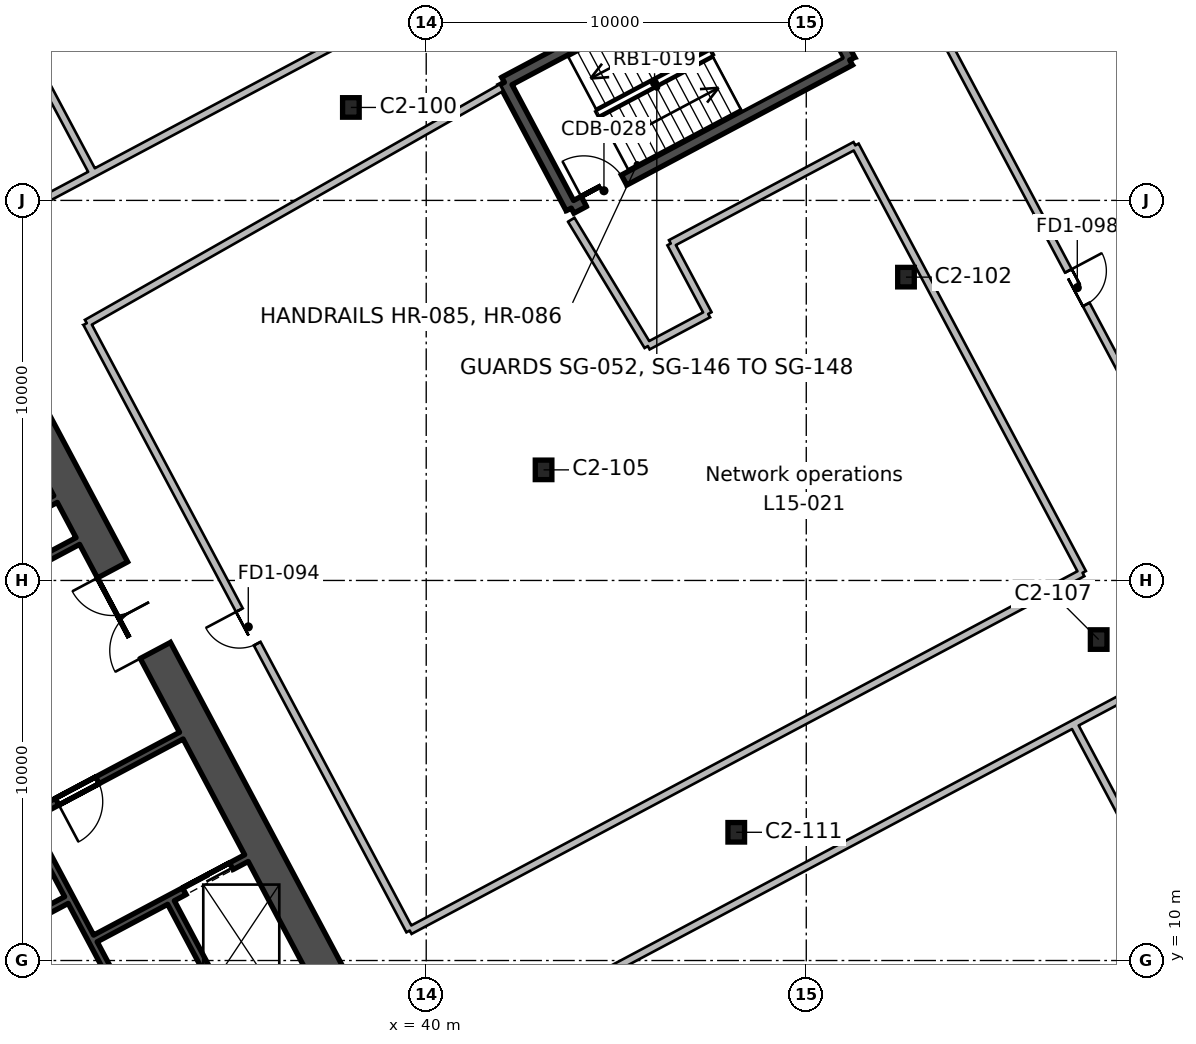
"""IFC4 building model, lengths in metres.
Left out: names, types, materials, properties, quantities, classifications, styles, units other than length and angle.
Written with IfcOpenShell. Run it as: python <this file> out.ifc"""

import sys

from ifc_helpers import new_model, si_unit, direction, frame, frame_2d, origin, origin_2d, place, context, subcontext, project, spatial, rectangle, i_section, extrude, element, fill, save


model = new_model("IFC4")
c1 = context("Model", 3, precision=1e-05, world=origin(), true_north=direction((0.0, 1.0)))
c2 = subcontext(c1, "Body", "Model", "MODEL_VIEW")
j1 = project(units=[si_unit("LENGTHUNIT", "METRE"), si_unit("PLANEANGLEUNIT", "RADIAN")], contexts=[c1])
p1 = place(None, origin())
s1 = spatial("IfcSite", under=j1, at=p1, CompositionType="ELEMENT")
p2 = place(p1, origin())
s2 = spatial("IfcBuilding", under=s1, at=p2, CompositionType="ELEMENT")
p3 = place(p2, frame((0.0, 0.0, 80.0)))
s3 = spatial("IfcBuildingStorey", under=s2, at=p3, CompositionType="ELEMENT", Elevation=80.0)
for number, where, z_axis, x_axis in (
    (1, (48.158, 13.374, 0.0), (0.0, 0.0, 1.0), (1.0, 0.0, 0.0)),
    (2, (57.694, 18.445, 0.0), (0.0, 0.0, 1.0), (1.0, 0.0, 0.0)),
    (3, (43.088, 22.91, 0.0), (0.0, 0.0, 1.0), (1.0, 0.0, 0.0)),
    (4, (52.624, 27.981, 0.0), (0.0, 0.0, 1.0), (1.0, 0.0, 0.0)),
    (5, (38.018, 32.446, 0.0), (0.0, 0.0, 1.0), (1.0, 0.0, 0.0)),
):
    element("IfcColumn", number, at=place(p3, frame(where, z_axis=z_axis, x_axis=x_axis)), inside=s3, PredefinedType="COLUMN", context=c2, shape_type="SweptSolid", body=[
        extrude(i_section(OverallWidth=0.437, OverallDepth=0.513, WebThickness=0.061, FlangeThickness=0.097, FilletRadius=0.015, at=origin_2d()), origin(), (0.0, 0.0, 1.0), 4.6),
    ])
p4 = place(p3, frame((37.849, 8.799, 0.0), z_axis=(0.0, 0.0, 1.0), x_axis=(-0.469465789982, 0.882950662289, 0.0)))
e6 = element("IfcWall", 6, at=p4, inside=s3, PredefinedType="SHEAR", context=c2, shape_type="SweptSolid", body=[
    extrude(rectangle(XDim=20.0, YDim=0.9, at=frame_2d((10.0, 0.0))), origin(), (0.0, 0.0, 1.0), 4.6),
])
p5 = place(p4, frame((10.6, 0.0, 0.0)))
e7 = element("IfcOpeningElement", 7, at=p5, cuts=e6, PredefinedType="OPENING", context=c2, shape_type="SweptSolid", body=[
    extrude(rectangle(XDim=2.4, YDim=2.4, at=frame_2d((1.2, 1.2))), frame((0.0, 0.46, 0.0), z_axis=(0.0, -1.0, 0.0), x_axis=(1.0, 0.0, 0.0)), (0.0, 0.0, 1.0), 0.92),
])
p6 = place(p3, frame((32.968, 7.223, 0.0), z_axis=(0.0, 0.0, 1.0), x_axis=(-0.469480409012, 0.88294288918, 0.0)))
e8 = element("IfcWall", 8, at=p6, inside=s3, PredefinedType="SHEAR", context=c2, shape_type="SweptSolid", body=[
    extrude(rectangle(XDim=7.3, YDim=0.2, at=frame_2d((3.65, 0.0))), origin(), (0.0, 0.0, 1.0), 4.6),
])
p7 = place(p3, frame((34.999, 8.303, 0.0), z_axis=(0.0, 0.0, 1.0), x_axis=(-0.4694665462, 0.882950260207, 0.0)))
e9 = element("IfcWall", 9, at=p7, inside=s3, PredefinedType="SHEAR", context=c2, shape_type="SweptSolid", body=[
    extrude(rectangle(XDim=3.65, YDim=0.2, at=frame_2d((1.825, 0.0))), origin(), (0.0, 0.0, 1.0), 4.6),
])
p8 = place(p3, frame((31.296, 10.581, 0.0), z_axis=(0.0, 0.0, 1.0), x_axis=(0.882960433586, 0.469447412093, 0.0)))
e10 = element("IfcWall", 10, at=p8, inside=s3, PredefinedType="SHEAR", context=c2, shape_type="SweptSolid", body=[
    extrude(rectangle(XDim=4.5, YDim=0.2, at=frame_2d((2.25, 0.0))), origin(), (0.0, 0.0, 1.0), 4.6),
])
p9 = place(p8, frame((2.65, 0.0, 0.0)))
e11 = element("IfcOpeningElement", 11, at=p9, cuts=e10, PredefinedType="OPENING", context=c2, shape_type="SweptSolid", body=[
    extrude(rectangle(XDim=1.4, YDim=2.4, at=frame_2d((0.7, 1.2))), frame((0.0, 0.11, 0.0), z_axis=(0.0, -1.0, 0.0), x_axis=(1.0, 0.0, 0.0)), (0.0, 0.0, 1.0), 0.22),
])
p10 = place(p3, frame((25.941, 9.15, 0.0), z_axis=(0.0, 0.0, 1.0), x_axis=(0.882953967957, 0.469459572775, 0.0)))
e12 = element("IfcWall", 12, at=p10, inside=s3, PredefinedType="SHEAR", context=c2, shape_type="SweptSolid", body=[
    extrude(rectangle(XDim=5.2, YDim=0.2, at=frame_2d((2.6, 0.0))), origin(), (0.0, 0.0, 1.0), 4.6),
])
p11 = place(p3, frame((24.726, 11.222, 0.0), z_axis=(0.0, 0.0, 1.0), x_axis=(0.882940221191, 0.469485426614, 0.0)))
e13 = element("IfcWall", 13, at=p11, inside=s3, PredefinedType="SHEAR", context=c2, shape_type="SweptSolid", body=[
    extrude(rectangle(XDim=10.0, YDim=0.2, at=frame_2d((5.0, 0.0))), origin(), (0.0, 0.0, 1.0), 4.6),
])
p12 = place(p11, frame((6.3, 0.0, 0.0)))
e14 = element("IfcOpeningElement", 14, at=p12, cuts=e13, PredefinedType="OPENING", context=c2, shape_type="SweptSolid", body=[
    extrude(rectangle(XDim=1.2, YDim=2.1, at=frame_2d((0.6, 1.05))), frame((0.0, 0.11, 0.0), z_axis=(0.0, -1.0, 0.0), x_axis=(1.0, 0.0, 0.0)), (0.0, 0.0, 1.0), 0.22),
])
p13 = place(p11, frame((2.25, 0.0, 0.0)))
e15 = element("IfcOpeningElement", 15, at=p13, cuts=e13, PredefinedType="OPENING", context=c2, shape_type="SweptSolid", body=[
    extrude(rectangle(XDim=0.9, YDim=2.1, at=frame_2d((0.45, 1.05))), frame((0.0, 0.11, 0.0), z_axis=(0.0, -1.0, 0.0), x_axis=(1.0, 0.0, 0.0)), (0.0, 0.0, 1.0), 0.22),
])
p14 = place(p3, frame((23.769, 17.282, 0.0), z_axis=(0.0, 0.0, 1.0), x_axis=(0.882940221191, 0.469485426614, 0.0)))
e16 = element("IfcWall", 16, at=p14, inside=s3, PredefinedType="SHEAR", context=c2, shape_type="SweptSolid", body=[
    extrude(rectangle(XDim=8.0, YDim=0.2, at=frame_2d((4.0, 0.0))), origin(), (0.0, 0.0, 1.0), 4.6),
])
p15 = place(p3, frame((23.182, 18.385, 0.0), z_axis=(0.0, 0.0, 1.0), x_axis=(0.88295287151, 0.469461634952, 0.0)))
e17 = element("IfcWall", 17, at=p15, inside=s3, PredefinedType="SHEAR", context=c2, shape_type="SweptSolid", body=[
    extrude(rectangle(XDim=8.0, YDim=0.2, at=frame_2d((4.0, 0.0))), origin(), (0.0, 0.0, 1.0), 4.6),
])
p16 = place(p3, frame((49.384, 37.004, 0.0), z_axis=(0.0, 0.0, 1.0), x_axis=(0.46946936446, -0.882948761726, 0.0)))
e18 = element("IfcWall", 18, at=p16, inside=s3, PredefinedType="SHEAR", context=c2, shape_type="SweptSolid", body=[
    extrude(rectangle(XDim=3.75, YDim=0.3, at=frame_2d((1.875, 0.0))), origin(), (0.0, 0.0, 1.0), 4.6),
])
p17 = place(p3, frame((51.145, 33.693, 0.0), z_axis=(0.0, 0.0, 1.0), x_axis=(-0.882945809314, -0.469474917132, 0.0)))
e19 = element("IfcWall", 19, at=p17, inside=s3, PredefinedType="SHEAR", context=c2, shape_type="SweptSolid", body=[
    extrude(rectangle(XDim=8.3, YDim=0.3, at=frame_2d((4.15, 0.0))), origin(), (0.0, 0.0, 1.0), 4.6),
])
p18 = place(p17, frame((6.725, 0.0, 0.0)))
e20 = element("IfcOpeningElement", 20, at=p18, cuts=e19, PredefinedType="OPENING", context=c2, shape_type="SweptSolid", body=[
    extrude(rectangle(XDim=1.2, YDim=2.1, at=frame_2d((0.6, 1.05))), frame((0.0, 0.16, 0.0), z_axis=(0.0, -1.0, 0.0), x_axis=(1.0, 0.0, 0.0)), (0.0, 0.0, 1.0), 0.32),
])
p19 = place(p3, frame((43.816, 29.796, 0.0), z_axis=(0.0, 0.0, 1.0), x_axis=(-0.46946936446, 0.882948761726, 0.0)))
e21 = element("IfcWall", 21, at=p19, inside=s3, PredefinedType="SHEAR", context=c2, shape_type="SweptSolid", body=[
    extrude(rectangle(XDim=3.75, YDim=0.3, at=frame_2d((1.875, 0.0))), origin(), (0.0, 0.0, 1.0), 4.6),
])
p20 = place(p3, frame((42.055, 33.107, 0.0), z_axis=(0.0, 0.0, 1.0), x_axis=(0.882945809314, 0.469474917132, 0.0)))
e22 = element("IfcWall", 22, at=p20, inside=s3, PredefinedType="SHEAR", context=c2, shape_type="SweptSolid", body=[
    extrude(rectangle(XDim=8.3, YDim=0.3, at=frame_2d((4.15, 0.0))), origin(), (0.0, 0.0, 1.0), 4.6),
])
p21 = place(p3, frame((0.0, 14.1, 0.0), z_axis=(0.0, 0.0, 1.0), x_axis=(0.882942713919, 0.469480738623, 0.0)))
e23 = element("IfcWall", 23, at=p21, inside=s3, PredefinedType="PARTITIONING", context=c2, shape_type="SweptSolid", body=[
    extrude(rectangle(XDim=36.591, YDim=0.2, at=frame_2d((18.296, 0.0))), origin(), (0.0, 0.0, 1.0), 4.2),
])
p22 = place(p21, frame((20.45, 0.0, 0.0)))
e24 = element("IfcOpeningElement", 24, at=p22, cuts=e23, PredefinedType="OPENING", context=c2, shape_type="SweptSolid", body=[
    extrude(rectangle(XDim=1.0, YDim=2.1, at=frame_2d((0.5, 1.05))), frame((0.0, 0.11, 0.0), z_axis=(0.0, -1.0, 0.0), x_axis=(1.0, 0.0, 0.0)), (0.0, 0.0, 1.0), 0.22),
])
p23 = place(p21, frame((17.75, 0.0, 0.0)))
e25 = element("IfcOpeningElement", 25, at=p23, cuts=e23, PredefinedType="OPENING", context=c2, shape_type="SweptSolid", body=[
    extrude(rectangle(XDim=1.0, YDim=2.1, at=frame_2d((0.5, 1.05))), frame((0.0, 0.11, 0.0), z_axis=(0.0, -1.0, 0.0), x_axis=(1.0, 0.0, 0.0)), (0.0, 0.0, 1.0), 0.22),
])
p24 = place(p3, frame((57.041, 16.229, 0.0), z_axis=(0.0, 0.0, 1.0), x_axis=(-0.882947975476, -0.469470843188, 0.0)))
e26 = element("IfcWall", 26, at=p24, inside=s3, PredefinedType="PARTITIONING", context=c2, shape_type="SweptSolid", body=[
    extrude(rectangle(XDim=49.2, YDim=0.2, at=frame_2d((24.6, 0.0))), origin(), (0.0, 0.0, 1.0), 4.2),
])
p25 = place(p24, frame((33.25, 0.0, 0.0)))
e27 = element("IfcOpeningElement", 27, at=p25, cuts=e26, PredefinedType="OPENING", context=c2, shape_type="SweptSolid", body=[
    extrude(rectangle(XDim=1.0, YDim=2.1, at=frame_2d((0.5, 1.05))), frame((0.0, 0.11, 0.0), z_axis=(0.0, -1.0, 0.0), x_axis=(1.0, 0.0, 0.0)), (0.0, 0.0, 1.0), 0.22),
])
p26 = place(p24, frame((24.05, 0.0, 0.0)))
e28 = element("IfcOpeningElement", 28, at=p26, cuts=e26, PredefinedType="OPENING", context=c2, shape_type="SweptSolid", body=[
    extrude(rectangle(XDim=1.0, YDim=2.1, at=frame_2d((0.5, 1.05))), frame((0.0, 0.11, 0.0), z_axis=(0.0, -1.0, 0.0), x_axis=(1.0, 0.0, 0.0)), (0.0, 0.0, 1.0), 0.22),
])
p27 = place(p24, frame((20.95, 0.0, 0.0)))
e29 = element("IfcOpeningElement", 29, at=p27, cuts=e26, PredefinedType="OPENING", context=c2, shape_type="SweptSolid", body=[
    extrude(rectangle(XDim=1.0, YDim=2.1, at=frame_2d((0.5, 1.05))), frame((0.0, 0.11, 0.0), z_axis=(0.0, -1.0, 0.0), x_axis=(1.0, 0.0, 0.0)), (0.0, 0.0, 1.0), 0.22),
])
p28 = place(p3, frame((30.235, 32.599, 0.0), z_axis=(0.0, 0.0, 1.0), x_axis=(0.46945013559, -0.882958985568, 0.0)))
e30 = element("IfcWall", 30, at=p28, inside=s3, PredefinedType="PARTITIONING", context=c2, shape_type="SweptSolid", body=[
    extrude(rectangle(XDim=2.138, YDim=0.2, at=frame_2d((1.069, 0.0))), origin(), (0.0, 0.0, 1.0), 4.2),
])
p29 = place(p3, frame((30.235, 32.599, 0.0), z_axis=(0.0, 0.0, 1.0), x_axis=(-0.469599917758, 0.882879333341, 0.0)))
e31 = element("IfcWall", 31, at=p29, inside=s3, PredefinedType="PARTITIONING", context=c2, shape_type="SweptSolid", body=[
    extrude(rectangle(XDim=3.412, YDim=0.2, at=frame_2d((1.706, 0.0))), origin(), (0.0, 0.0, 1.0), 4.2),
])
p30 = place(p3, frame((32.308, 31.279, 0.0), z_axis=(0.0, 0.0, 1.0), x_axis=(0.882939951573, 0.469485933673, 0.0)))
e32 = element("IfcWall", 32, at=p30, inside=s3, PredefinedType="PARTITIONING", context=c2, shape_type="SweptSolid", body=[
    extrude(rectangle(XDim=20.239, YDim=0.2, at=frame_2d((10.12, 0.0))), origin(), (0.0, 0.0, 1.0), 4.2),
])
p31 = place(p30, frame((9.65, 0.0, 0.0)))
e33 = element("IfcOpeningElement", 33, at=p31, cuts=e32, PredefinedType="OPENING", context=c2, shape_type="SweptSolid", body=[
    extrude(rectangle(XDim=1.0, YDim=2.1, at=frame_2d((0.5, 1.05))), frame((0.0, 0.11, 0.0), z_axis=(0.0, -1.0, 0.0), x_axis=(1.0, 0.0, 0.0)), (0.0, 0.0, 1.0), 0.22),
])
p32 = place(p3, frame((57.034, 16.225, 0.0), z_axis=(0.0, 0.0, 1.0), x_axis=(0.469482945701, -0.882941540361, 0.0)))
e34 = element("IfcWall", 34, at=p32, inside=s3, PredefinedType="PARTITIONING", context=c2, shape_type="SweptSolid", body=[
    extrude(rectangle(XDim=8.75, YDim=0.2, at=frame_2d((4.375, 0.0))), origin(), (0.0, 0.0, 1.0), 4.2),
])
p33 = place(p3, frame((48.541, 15.56, 0.0), z_axis=(0.0, 0.0, 1.0), x_axis=(-0.882933406877, -0.469498241765, 0.0)))
e35 = element("IfcWall", 35, at=p33, inside=s3, PredefinedType="PARTITIONING", context=c2, shape_type="SweptSolid", body=[
    extrude(rectangle(XDim=10.164, YDim=0.2, at=frame_2d((5.082, 0.0))), origin(), (0.0, 0.0, 1.0), 4.2),
])
p34 = place(p3, frame((39.567, 10.788, 0.0), z_axis=(0.0, 0.0, 1.0), x_axis=(-0.469474056812, 0.882946266757, 0.0)))
e36 = element("IfcWall", 36, at=p34, inside=s3, PredefinedType="PARTITIONING", context=c2, shape_type="SweptSolid", body=[
    extrude(rectangle(XDim=18.101, YDim=0.2, at=frame_2d((9.05, 0.0))), origin(), (0.0, 0.0, 1.0), 4.2),
])
p35 = place(p34, frame((8.55, 0.0, 0.0)))
e37 = element("IfcOpeningElement", 37, at=p35, cuts=e36, PredefinedType="OPENING", context=c2, shape_type="SweptSolid", body=[
    extrude(rectangle(XDim=1.0, YDim=2.1, at=frame_2d((0.5, 1.05))), frame((0.0, 0.11, 0.0), z_axis=(0.0, -1.0, 0.0), x_axis=(1.0, 0.0, 0.0)), (0.0, 0.0, 1.0), 0.22),
])
p36 = place(p3, frame((31.069, 26.77, 0.0), z_axis=(0.0, 0.0, 1.0), x_axis=(0.86954617394, 0.493851649168, 0.0)))
e38 = element("IfcWall", 38, at=p36, inside=s3, PredefinedType="PARTITIONING", context=c2, shape_type="SweptSolid", body=[
    extrude(rectangle(XDim=12.55, YDim=0.2, at=frame_2d((6.275, 0.0))), origin(), (0.0, 0.0, 1.0), 4.2),
])
p37 = place(p3, frame((43.816, 29.491, 0.0), z_axis=(0.0, 0.0, 1.0), x_axis=(0.518473208291, -0.855093873376, 0.0)))
e39 = element("IfcWall", 39, at=p37, inside=s3, PredefinedType="PARTITIONING", context=c2, shape_type="SweptSolid", body=[
    extrude(rectangle(XDim=1.325, YDim=0.2, at=frame_2d((0.663, 0.0))), origin(), (0.0, 0.0, 1.0), 4.2),
])
p38 = place(p3, frame((45.831, 26.167, 0.0), z_axis=(0.0, 0.0, 1.0), x_axis=(-0.518386189645, 0.855146629757, 0.0)))
e40 = element("IfcWall", 40, at=p38, inside=s3, PredefinedType="PARTITIONING", context=c2, shape_type="SweptSolid", body=[
    extrude(rectangle(XDim=2.562, YDim=0.2, at=frame_2d((1.281, 0.0))), origin(), (0.0, 0.0, 1.0), 4.2),
])
p39 = place(p3, frame((47.42, 27.012, 0.0), z_axis=(0.0, 0.0, 1.0), x_axis=(-0.882911879422, -0.469538723829, 0.0)))
e41 = element("IfcWall", 41, at=p39, inside=s3, PredefinedType="PARTITIONING", context=c2, shape_type="SweptSolid", body=[
    extrude(rectangle(XDim=1.8, YDim=0.2, at=frame_2d((0.9, 0.0))), origin(), (0.0, 0.0, 1.0), 4.2),
])
p40 = place(p3, frame((46.434, 28.866, 0.0), z_axis=(0.0, 0.0, 1.0), x_axis=(0.882942083458, 0.469481924316, 0.0)))
e42 = element("IfcWall", 42, at=p40, inside=s3, PredefinedType="PARTITIONING", context=c2, shape_type="SweptSolid", body=[
    extrude(rectangle(XDim=5.5, YDim=0.2, at=frame_2d((2.75, 0.0))), origin(), (0.0, 0.0, 1.0), 4.2),
])
p41 = place(p3, frame((51.29, 31.448, 0.0), z_axis=(0.0, 0.0, 1.0), x_axis=(0.469459757109, -0.882953869947, 0.0)))
e43 = element("IfcWall", 43, at=p41, inside=s3, PredefinedType="PARTITIONING", context=c2, shape_type="SweptSolid", body=[
    extrude(rectangle(XDim=12.738, YDim=0.2, at=frame_2d((6.369, 0.0))), origin(), (0.0, 0.0, 1.0), 4.2),
])
p42 = place(p3, frame((57.27, 20.201, 0.0), z_axis=(0.0, 0.0, 1.0), x_axis=(-0.882965394181, -0.469438081837, 0.0)))
e44 = element("IfcWall", 44, at=p42, inside=s3, PredefinedType="PARTITIONING", context=c2, shape_type="SweptSolid", body=[
    extrude(rectangle(XDim=9.886, YDim=0.2, at=frame_2d((4.943, 0.0))), origin(), (0.0, 0.0, 1.0), 4.2),
])
p43 = place(p3, frame((47.42, 27.012, 0.0), z_axis=(0.0, 0.0, 1.0), x_axis=(-0.469489562011, 0.882938022266, 0.0)))
e45 = element("IfcWall", 45, at=p43, inside=s3, PredefinedType="PARTITIONING", context=c2, shape_type="SweptSolid", body=[
    extrude(rectangle(XDim=2.1, YDim=0.2, at=frame_2d((1.05, 0.0))), origin(), (0.0, 0.0, 1.0), 4.2),
])
p44 = place(p3, frame((57.041, 16.229, 0.0), z_axis=(0.0, 0.0, 1.0), x_axis=(0.882918476145, 0.469526319265, 0.0)))
e46 = element("IfcWall", 46, at=p44, inside=s3, PredefinedType="PARTITIONING", context=c2, shape_type="SweptSolid", body=[
    extrude(rectangle(XDim=5.467, YDim=0.2, at=frame_2d((2.733, 0.0))), origin(), (0.0, 0.0, 1.0), 4.2),
])
p45 = place(p3, frame((52.366, 36.665, 0.0), z_axis=(0.0, 0.0, 1.0), x_axis=(0.469480933333, -0.882942610387, 0.0)))
e47 = element("IfcWall", 47, at=p45, inside=s3, PredefinedType="PARTITIONING", context=c2, shape_type="SweptSolid", body=[
    extrude(rectangle(XDim=20.239, YDim=0.2, at=frame_2d((10.12, 0.0))), origin(), (0.0, 0.0, 1.0), 4.2),
])
p46 = place(p45, frame((9.65, 0.0, 0.0)))
e48 = element("IfcOpeningElement", 48, at=p46, cuts=e47, PredefinedType="OPENING", context=c2, shape_type="SweptSolid", body=[
    extrude(rectangle(XDim=1.0, YDim=2.1, at=frame_2d((0.5, 1.05))), frame((0.0, 0.11, 0.0), z_axis=(0.0, -1.0, 0.0), x_axis=(1.0, 0.0, 0.0)), (0.0, 0.0, 1.0), 0.22),
])
p47 = place(p3, frame((57.299, 39.208, 0.0), z_axis=(0.0, 0.0, 1.0), x_axis=(0.469480728433, -0.882942719337, 0.0)))
e49 = element("IfcWall", 49, at=p47, inside=s3, PredefinedType="PARTITIONING", context=c2, shape_type="SweptSolid", body=[
    extrude(rectangle(XDim=28.934, YDim=0.2, at=frame_2d((14.467, 0.0))), origin(), (0.0, 0.0, 1.0), 4.2),
])
p48 = place(p5, origin())
e50 = element("IfcDoor", 50, at=p48, inside=s3, OperationType="DOUBLE_DOOR_SINGLE_SWING", PredefinedType="DOOR", context=c2, shape_type="SweptSolid", body=[
    extrude(rectangle(XDim=2.4, YDim=2.4, at=frame_2d((1.2, 1.2))), frame((0.0, 0.025, 0.0), z_axis=(0.0, -1.0, 0.0), x_axis=(1.0, 0.0, 0.0)), (0.0, 0.0, 1.0), 0.05),
])
fill(e7, e50)
p49 = place(p12, frame((1.2, 0.0, 0.0), z_axis=(0.0, 0.0, 1.0), x_axis=(-1.0, 0.0, 0.0)))
e51 = element("IfcDoor", 51, at=p49, inside=s3, OperationType="SINGLE_SWING_RIGHT", PredefinedType="DOOR", context=c2, shape_type="SweptSolid", body=[
    extrude(rectangle(XDim=1.2, YDim=2.1, at=frame_2d((0.6, 1.05))), frame((0.0, 0.025, 0.0), z_axis=(0.0, -1.0, 0.0), x_axis=(1.0, 0.0, 0.0)), (0.0, 0.0, 1.0), 0.05),
])
fill(e14, e51)
p50 = place(p9, origin())
e52 = element("IfcDoor", 52, at=p50, inside=s3, OperationType="DOUBLE_DOOR_SLIDING", PredefinedType="DOOR", context=c2, shape_type="SweptSolid", body=[
    extrude(rectangle(XDim=1.4, YDim=2.4, at=frame_2d((0.7, 1.2))), frame((0.0, 0.025, 0.0), z_axis=(0.0, -1.0, 0.0), x_axis=(1.0, 0.0, 0.0)), (0.0, 0.0, 1.0), 0.05),
])
fill(e11, e52)
p51 = place(p18, frame((1.2, 0.0, 0.0), z_axis=(0.0, 0.0, 1.0), x_axis=(-1.0, 0.0, 0.0)))
e53 = element("IfcDoor", 53, at=p51, inside=s3, OperationType="SINGLE_SWING_LEFT", PredefinedType="DOOR", context=c2, shape_type="SweptSolid", body=[
    extrude(rectangle(XDim=1.2, YDim=2.1, at=frame_2d((0.6, 1.05))), frame((0.0, 0.025, 0.0), z_axis=(0.0, -1.0, 0.0), x_axis=(1.0, 0.0, 0.0)), (0.0, 0.0, 1.0), 0.05),
])
fill(e20, e53)
p52 = place(p46, origin())
e54 = element("IfcDoor", 54, at=p52, inside=s3, OperationType="SINGLE_SWING_LEFT", PredefinedType="DOOR", context=c2, shape_type="SweptSolid", body=[
    extrude(rectangle(XDim=1.0, YDim=2.1, at=frame_2d((0.5, 1.05))), frame((0.0, 0.025, 0.0), z_axis=(0.0, -1.0, 0.0), x_axis=(1.0, 0.0, 0.0)), (0.0, 0.0, 1.0), 0.05),
])
fill(e48, e54)
p53 = place(p35, origin())
e55 = element("IfcDoor", 55, at=p53, inside=s3, OperationType="SINGLE_SWING_RIGHT", PredefinedType="DOOR", context=c2, shape_type="SweptSolid", body=[
    extrude(rectangle(XDim=1.0, YDim=2.1, at=frame_2d((0.5, 1.05))), frame((0.0, 0.025, 0.0), z_axis=(0.0, -1.0, 0.0), x_axis=(1.0, 0.0, 0.0)), (0.0, 0.0, 1.0), 0.05),
])
fill(e37, e55)
save(model, sys.argv[1])
